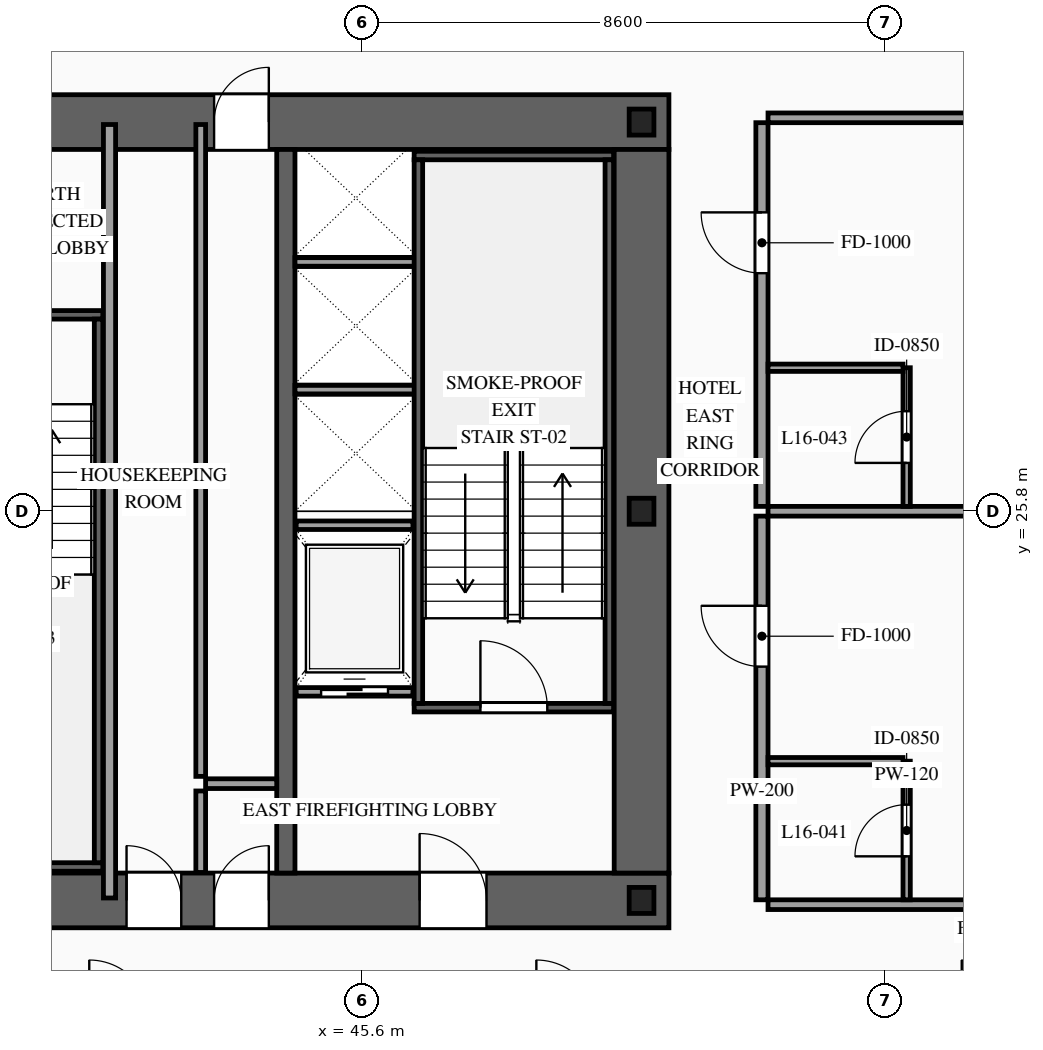
"""IFC4 building model, lengths in metres.
Left out: names, types, materials, properties, quantities, classifications, styles, units other than length and angle.
Written with IfcOpenShell. Run it as: python <this file> out.ifc"""

import sys

from ifc_helpers import new_model, si_unit, direction, frame, frame_2d, origin, origin_2d, place, context, subcontext, project, spatial, rectangle, i_section, extrude, source, transform, mapped, element, fill, save


model = new_model("IFC4")
c1 = context("Model", 3, precision=1e-05, world=origin(), true_north=direction((0.0, 1.0)))
c2 = subcontext(c1, "Body", "Model", "MODEL_VIEW")
j1 = project(units=[si_unit("LENGTHUNIT", "METRE"), si_unit("PLANEANGLEUNIT", "RADIAN")], contexts=[c1])
p1 = place(None, origin())
s1 = spatial("IfcSite", under=j1, at=p1, CompositionType="ELEMENT")
p2 = place(p1, origin())
s2 = spatial("IfcBuilding", under=s1, at=p2, CompositionType="ELEMENT")
p3 = place(p2, frame((0.0, 0.0, 64.0)))
s3 = spatial("IfcBuildingStorey", under=s2, at=p3, CompositionType="ELEMENT", Elevation=64.0)
p4 = place(p3, frame((23.35, 19.4, 0.0), z_axis=(0.0, 0.0, 1.0), x_axis=(1.0, 0.0, 0.0)))
e1 = element("IfcWall", 1, at=p4, inside=s3, PredefinedType="SHEAR", context=c2, shape_type="SweptSolid", body=[
    extrude(rectangle(XDim=27.3, YDim=0.9, at=frame_2d((13.65, 0.0))), origin(), (0.0, 0.0, 1.0), 3.6),
])
p5 = place(p4, frame((2.1, 0.0, 0.0)))
e2 = element("IfcOpeningElement", 2, at=p5, cuts=e1, PredefinedType="OPENING", context=c2, shape_type="SweptSolid", body=[
    extrude(rectangle(XDim=1.1, YDim=2.2, at=frame_2d((0.55, 1.1))), frame((0.0, 0.465, 0.0), z_axis=(0.0, -1.0, 0.0), x_axis=(1.0, 0.0, 0.0)), (0.0, 0.0, 1.0), 0.93),
])
p6 = place(p4, frame((10.0, 0.0, 0.0)))
e3 = element("IfcOpeningElement", 3, at=p6, cuts=e1, PredefinedType="OPENING", context=c2, shape_type="SweptSolid", body=[
    extrude(rectangle(XDim=1.1, YDim=2.2, at=frame_2d((0.55, 1.1))), frame((0.0, 0.465, 0.0), z_axis=(0.0, -1.0, 0.0), x_axis=(1.0, 0.0, 0.0)), (0.0, 0.0, 1.0), 0.93),
])
p7 = place(p4, frame((23.2, 0.0, 0.0)))
e4 = element("IfcOpeningElement", 4, at=p7, cuts=e1, PredefinedType="OPENING", context=c2, shape_type="SweptSolid", body=[
    extrude(rectangle(XDim=1.1, YDim=2.2, at=frame_2d((0.55, 1.1))), frame((0.0, 0.465, 0.0), z_axis=(0.0, -1.0, 0.0), x_axis=(1.0, 0.0, 0.0)), (0.0, 0.0, 1.0), 0.93),
])
p8 = place(p4, frame((19.82, 0.0, 0.0)))
e5 = element("IfcOpeningElement", 5, at=p8, cuts=e1, PredefinedType="OPENING", context=c2, shape_type="SweptSolid", body=[
    extrude(rectangle(XDim=0.9, YDim=2.15, at=frame_2d((0.45, 1.075))), frame((0.0, 0.465, 0.0), z_axis=(0.0, -1.0, 0.0), x_axis=(1.0, 0.0, 0.0)), (0.0, 0.0, 1.0), 0.93),
])
p9 = place(p4, frame((18.38, 0.0, 0.0)))
e6 = element("IfcOpeningElement", 6, at=p9, cuts=e1, PredefinedType="OPENING", context=c2, shape_type="SweptSolid", body=[
    extrude(rectangle(XDim=0.9, YDim=2.15, at=frame_2d((0.45, 1.075))), frame((0.0, 0.465, 0.0), z_axis=(0.0, -1.0, 0.0), x_axis=(1.0, 0.0, 0.0)), (0.0, 0.0, 1.0), 0.93),
])
p10 = place(p3, frame((23.35, 32.2, 0.0), z_axis=(0.0, 0.0, 1.0), x_axis=(1.0, 0.0, 0.0)))
e7 = element("IfcWall", 7, at=p10, inside=s3, PredefinedType="SHEAR", context=c2, shape_type="SweptSolid", body=[
    extrude(rectangle(XDim=27.3, YDim=0.9, at=frame_2d((13.65, 0.0))), origin(), (0.0, 0.0, 1.0), 3.6),
])
p11 = place(p10, frame((4.72, 0.0, 0.0)))
e8 = element("IfcOpeningElement", 8, at=p11, cuts=e7, PredefinedType="OPENING", context=c2, shape_type="SweptSolid", body=[
    extrude(rectangle(XDim=0.9, YDim=2.15, at=frame_2d((0.45, 1.075))), frame((0.0, 0.465, 0.0), z_axis=(0.0, -1.0, 0.0), x_axis=(1.0, 0.0, 0.0)), (0.0, 0.0, 1.0), 0.93),
])
p12 = place(p10, frame((10.0, 0.0, 0.0)))
e9 = element("IfcOpeningElement", 9, at=p12, cuts=e7, PredefinedType="OPENING", context=c2, shape_type="SweptSolid", body=[
    extrude(rectangle(XDim=1.1, YDim=2.2, at=frame_2d((0.55, 1.1))), frame((0.0, 0.465, 0.0), z_axis=(0.0, -1.0, 0.0), x_axis=(1.0, 0.0, 0.0)), (0.0, 0.0, 1.0), 0.93),
])
p13 = place(p10, frame((15.85, 0.0, 0.0)))
e10 = element("IfcOpeningElement", 10, at=p13, cuts=e7, PredefinedType="OPENING", context=c2, shape_type="SweptSolid", body=[
    extrude(rectangle(XDim=1.1, YDim=2.2, at=frame_2d((0.55, 1.1))), frame((0.0, 0.465, 0.0), z_axis=(0.0, -1.0, 0.0), x_axis=(1.0, 0.0, 0.0)), (0.0, 0.0, 1.0), 0.93),
])
p14 = place(p10, frame((19.82, 0.0, 0.0)))
e11 = element("IfcOpeningElement", 11, at=p14, cuts=e7, PredefinedType="OPENING", context=c2, shape_type="SweptSolid", body=[
    extrude(rectangle(XDim=0.9, YDim=2.15, at=frame_2d((0.45, 1.075))), frame((0.0, 0.465, 0.0), z_axis=(0.0, -1.0, 0.0), x_axis=(1.0, 0.0, 0.0)), (0.0, 0.0, 1.0), 0.93),
])
m1 = source(origin(), c2, "Body", "SweptSolid", [
    extrude(rectangle(XDim=11.9, YDim=0.9, at=frame_2d((5.95, 0.0))), origin(), (0.0, 0.0, 1.0), 3.6),
])
p15 = place(p3, frame((50.2, 19.85, 0.0), z_axis=(0.0, 0.0, 1.0), x_axis=(0.0, 1.0, 0.0)))
e12 = element("IfcWall", 12, at=p15, inside=s3, PredefinedType="SHEAR", context=c2, shape_type="MappedRepresentation", body=[
    mapped(m1, transform((0.0, 0.0, 0.0), scale=1.0)),
])
m2 = source(origin(), c2, "Body", "SweptSolid", [
    extrude(rectangle(XDim=11.9, YDim=0.3, at=frame_2d((5.95, 0.0))), origin(), (0.0, 0.0, 1.0), 3.6),
])
p16 = place(p3, frame((44.35, 19.85, 0.0), z_axis=(0.0, 0.0, 1.0), x_axis=(0.0, 1.0, 0.0)))
e13 = element("IfcWall", 13, at=p16, inside=s3, PredefinedType="SOLIDWALL", context=c2, shape_type="MappedRepresentation", body=[
    mapped(m2, transform((0.0, 0.0, 0.0), scale=1.0)),
])
m3 = source(origin(), c2, "Body", "SweptSolid", [
    extrude(i_section(OverallWidth=0.407, OverallDepth=0.428, WebThickness=0.02, FlangeThickness=0.035, at=origin_2d()), origin(), (0.0, 0.0, 1.0), 3.6),
])
for number, where, z_axis, x_axis in (
    (14, (50.2, 19.4, 0.0), (0.0, 0.0, 1.0), (1.0, 0.0, 0.0)),
    (15, (50.2, 25.8, 0.0), (0.0, 0.0, 1.0), (1.0, 0.0, 0.0)),
    (16, (50.2, 32.2, 0.0), (0.0, 0.0, 1.0), (1.0, 0.0, 0.0)),
):
    element("IfcColumn", number, at=place(p3, frame(where, z_axis=z_axis, x_axis=x_axis)), inside=s3, PredefinedType="COLUMN", context=c2, shape_type="MappedRepresentation", body=[
        mapped(m3, transform((0.0, 0.0, 0.0), scale=1.0)),
    ])
p17 = place(p3, frame((44.52, 22.83, 0.0), z_axis=(0.0, 0.0, 1.0), x_axis=(1.0, 0.0, 0.0)))
e17 = element("IfcWall", 17, at=p17, inside=s3, PredefinedType="SOLIDWALL", context=c2, shape_type="SweptSolid", body=[
    extrude(rectangle(XDim=1.92, YDim=0.14, at=frame_2d((0.96, 0.0))), origin(), (0.0, 0.0, 1.0), 3.38),
])
p18 = place(p17, frame((0.41, 0.0, 0.0)))
e18 = element("IfcOpeningElement", 18, at=p18, cuts=e17, PredefinedType="OPENING", context=c2, shape_type="SweptSolid", body=[
    extrude(rectangle(XDim=1.1, YDim=2.2, at=frame_2d((0.55, 1.1))), frame((0.0, 0.085, 0.0), z_axis=(0.0, -1.0, 0.0), x_axis=(1.0, 0.0, 0.0)), (0.0, 0.0, 1.0), 0.17),
])
m4 = source(origin(), c2, "Body", "SweptSolid", [
    extrude(rectangle(XDim=1.92, YDim=0.14, at=frame_2d((0.96, 0.0))), origin(), (0.0, 0.0, 1.0), 3.38),
])
p19 = place(p3, frame((44.52, 25.57, 0.0), z_axis=(0.0, 0.0, 1.0), x_axis=(1.0, 0.0, 0.0)))
e19 = element("IfcWall", 19, at=p19, inside=s3, PredefinedType="SOLIDWALL", context=c2, shape_type="MappedRepresentation", body=[
    mapped(m4, transform((0.0, 0.0, 0.0), scale=1.0)),
])
m5 = source(origin(), c2, "Body", "SweptSolid", [
    extrude(rectangle(XDim=2.0, YDim=0.14, at=frame_2d((1.0, 0.0))), origin(), (0.0, 0.0, 1.0), 3.38),
])
for number, where, z_axis, x_axis in (
    (20, (44.5, 27.8, 0.0), (0.0, 0.0, 1.0), (1.0, 0.0, 0.0)),
    (21, (44.5, 29.9, 0.0), (0.0, 0.0, 1.0), (1.0, 0.0, 0.0)),
):
    element("IfcWall", number, at=place(p3, frame(where, z_axis=z_axis, x_axis=x_axis)), inside=s3, PredefinedType="SOLIDWALL", context=c2, shape_type="MappedRepresentation", body=[
        mapped(m5, transform((0.0, 0.0, 0.0), scale=1.0)),
    ])
p20 = place(p3, frame((46.46, 22.57, 0.0), z_axis=(0.0, 0.0, 1.0), x_axis=(1.0, 0.0, 0.0)))
e22 = element("IfcWall", 22, at=p20, inside=s3, PredefinedType="SOLIDWALL", context=c2, shape_type="SweptSolid", body=[
    extrude(rectangle(XDim=3.28, YDim=0.14, at=frame_2d((1.64, 0.0))), origin(), (0.0, 0.0, 1.0), 3.38),
])
p21 = place(p20, frame((1.09, 0.0, 0.0)))
e23 = element("IfcOpeningElement", 23, at=p21, cuts=e22, PredefinedType="OPENING", context=c2, shape_type="SweptSolid", body=[
    extrude(rectangle(XDim=1.1, YDim=2.2, at=frame_2d((0.55, 1.1))), frame((0.0, 0.085, 0.0), z_axis=(0.0, -1.0, 0.0), x_axis=(1.0, 0.0, 0.0)), (0.0, 0.0, 1.0), 0.17),
])
m6 = source(origin(), c2, "Body", "SweptSolid", [
    extrude(rectangle(XDim=3.28, YDim=0.14, at=frame_2d((1.64, 0.0))), origin(), (0.0, 0.0, 1.0), 3.38),
])
p22 = place(p3, frame((46.46, 31.65, 0.0), z_axis=(0.0, 0.0, 1.0), x_axis=(1.0, 0.0, 0.0)))
e24 = element("IfcWall", 24, at=p22, inside=s3, PredefinedType="SOLIDWALL", context=c2, shape_type="MappedRepresentation", body=[
    mapped(m6, transform((0.0, 0.0, 0.0), scale=1.0)),
])
m7 = source(origin(), c2, "Body", "SweptSolid", [
    extrude(rectangle(XDim=8.94, YDim=0.14, at=frame_2d((4.47, 0.0))), origin(), (0.0, 0.0, 1.0), 3.38),
])
for number, where, z_axis, x_axis in (
    (25, (46.53, 22.64, 0.0), (0.0, 0.0, 1.0), (0.0, 1.0, 0.0)),
    (26, (49.67, 22.64, 0.0), (0.0, 0.0, 1.0), (0.0, 1.0, 0.0)),
):
    element("IfcWall", number, at=place(p3, frame(where, z_axis=z_axis, x_axis=x_axis)), inside=s3, PredefinedType="SOLIDWALL", context=c2, shape_type="MappedRepresentation", body=[
        mapped(m7, transform((0.0, 0.0, 0.0), scale=1.0)),
    ])
p23 = place(p3, frame((38.2, 29.03, 0.0), z_axis=(0.0, 0.0, 1.0), x_axis=(1.0, 0.0, 0.0)))
e27 = element("IfcWall", 27, at=p23, inside=s3, PredefinedType="SOLIDWALL", context=c2, shape_type="SweptSolid", body=[
    extrude(rectangle(XDim=3.14, YDim=0.14, at=frame_2d((1.57, 0.0))), origin(), (0.0, 0.0, 1.0), 3.38),
])
p24 = place(p23, frame((1.02, 0.0, 0.0)))
e28 = element("IfcOpeningElement", 28, at=p24, cuts=e27, PredefinedType="OPENING", context=c2, shape_type="SweptSolid", body=[
    extrude(rectangle(XDim=1.1, YDim=2.2, at=frame_2d((0.55, 1.1))), frame((0.0, 0.085, 0.0), z_axis=(0.0, -1.0, 0.0), x_axis=(1.0, 0.0, 0.0)), (0.0, 0.0, 1.0), 0.17),
])
m8 = source(origin(), c2, "Body", "SweptSolid", [
    extrude(rectangle(XDim=3.14, YDim=0.14, at=frame_2d((1.57, 0.0))), origin(), (0.0, 0.0, 1.0), 3.38),
])
p25 = place(p3, frame((38.2, 19.95, 0.0), z_axis=(0.0, 0.0, 1.0), x_axis=(1.0, 0.0, 0.0)))
e29 = element("IfcWall", 29, at=p25, inside=s3, PredefinedType="SOLIDWALL", context=c2, shape_type="MappedRepresentation", body=[
    mapped(m8, transform((0.0, 0.0, 0.0), scale=1.0)),
])
m9 = source(origin(), c2, "Body", "SweptSolid", [
    extrude(rectangle(XDim=8.94, YDim=0.14, at=frame_2d((4.47, 0.0))), origin(), (0.0, 0.0, 1.0), 3.38),
])
p26 = place(p3, frame((41.27, 20.02, 0.0), z_axis=(0.0, 0.0, 1.0), x_axis=(0.0, 1.0, 0.0)))
e30 = element("IfcWall", 30, at=p26, inside=s3, PredefinedType="SOLIDWALL", context=c2, shape_type="MappedRepresentation", body=[
    mapped(m9, transform((0.0, 0.0, 0.0), scale=1.0)),
])
m10 = source(origin(), c2, "Body", "SweptSolid", [
    extrude(rectangle(XDim=1.34, YDim=0.16, at=frame_2d((0.67, 0.0))), origin(), (0.0, 0.0, 1.0), 3.38),
])
p27 = place(p3, frame((42.95, 19.86, 0.0), z_axis=(0.0, 0.0, 1.0), x_axis=(0.0, 1.0, 0.0)))
e31 = element("IfcWall", 31, at=p27, inside=s3, PredefinedType="PARTITIONING", context=c2, shape_type="MappedRepresentation", body=[
    mapped(m10, transform((0.0, 0.0, 0.0), scale=1.0)),
])
m11 = source(origin(), c2, "Body", "SweptSolid", [
    extrude(rectangle(XDim=1.17, YDim=0.16, at=frame_2d((0.585, 0.0))), origin(), (0.0, 0.0, 1.0), 3.38),
])
p28 = place(p3, frame((43.03, 21.32, 0.0), z_axis=(0.0, 0.0, 1.0), x_axis=(1.0, 0.0, 0.0)))
e32 = element("IfcWall", 32, at=p28, inside=s3, PredefinedType="PARTITIONING", context=c2, shape_type="MappedRepresentation", body=[
    mapped(m11, transform((0.0, 0.0, 0.0), scale=1.0)),
])
m12 = source(origin(), c2, "Body", "SweptSolid", [
    extrude(rectangle(XDim=12.72, YDim=0.2, at=frame_2d((6.36, 0.0))), origin(), (0.0, 0.0, 1.0), 3.38),
])
p29 = place(p3, frame((41.45, 19.44, 0.0), z_axis=(0.0, 0.0, 1.0), x_axis=(0.0, 1.0, 0.0)))
e33 = element("IfcWall", 33, at=p29, inside=s3, PredefinedType="PARTITIONING", context=c2, shape_type="MappedRepresentation", body=[
    mapped(m12, transform((0.0, 0.0, 0.0), scale=1.0)),
])
m13 = source(origin(), c2, "Body", "SweptSolid", [
    extrude(rectangle(XDim=10.72, YDim=0.16, at=frame_2d((5.36, 0.0))), origin(), (0.0, 0.0, 1.0), 3.38),
])
p30 = place(p3, frame((42.95, 21.44, 0.0), z_axis=(0.0, 0.0, 1.0), x_axis=(0.0, 1.0, 0.0)))
e34 = element("IfcWall", 34, at=p30, inside=s3, PredefinedType="PARTITIONING", context=c2, shape_type="MappedRepresentation", body=[
    mapped(m13, transform((0.0, 0.0, 0.0), scale=1.0)),
])
p31 = place(p3, frame((52.18, 19.41, 0.0), z_axis=(0.0, 0.0, 1.0), x_axis=(0.0, 1.0, 0.0)))
e35 = element("IfcWall", 35, at=p31, inside=s3, PredefinedType="PARTITIONING", context=c2, shape_type="SweptSolid", body=[
    extrude(rectangle(XDim=6.31, YDim=0.2, at=frame_2d((3.155, 0.0))), origin(), (0.0, 0.0, 1.0), 3.38),
])
p32 = place(p31, frame((3.835, 0.0, 0.0)))
e36 = element("IfcOpeningElement", 36, at=p32, cuts=e35, PredefinedType="OPENING", context=c2, shape_type="SweptSolid", body=[
    extrude(rectangle(XDim=1.0, YDim=2.2, at=frame_2d((0.5, 1.1))), frame((0.0, 0.115, 0.0), z_axis=(0.0, -1.0, 0.0), x_axis=(1.0, 0.0, 0.0)), (0.0, 0.0, 1.0), 0.23),
])
m14 = source(origin(), c2, "Body", "SweptSolid", [
    extrude(rectangle(XDim=9.67, YDim=0.16, at=frame_2d((4.835, 0.0))), origin(), (0.0, 0.0, 1.0), 2.575),
])
p33 = place(p3, frame((52.28, 25.8, 0.0), z_axis=(0.0, 0.0, 1.0), x_axis=(1.0, 0.0, 0.0)))
e37 = element("IfcWall", 37, at=p33, inside=s3, PredefinedType="PARTITIONING", context=c2, shape_type="MappedRepresentation", body=[
    mapped(m14, transform((0.0, 0.0, 0.0), scale=1.0)),
])
m15 = source(origin(), c2, "Body", "SweptSolid", [
    extrude(rectangle(XDim=9.67, YDim=0.16, at=frame_2d((4.835, 0.0))), origin(), (0.0, 0.0, 1.0), 2.875),
])
p34 = place(p3, frame((52.28, 19.33, 0.0), z_axis=(0.0, 0.0, 1.0), x_axis=(1.0, 0.0, 0.0)))
e38 = element("IfcWall", 38, at=p34, inside=s3, PredefinedType="PARTITIONING", context=c2, shape_type="MappedRepresentation", body=[
    mapped(m15, transform((0.0, 0.0, 0.0), scale=1.0)),
])
p35 = place(p3, frame((54.56, 19.41, 0.0), z_axis=(0.0, 0.0, 1.0), x_axis=(0.0, 1.0, 0.0)))
e39 = element("IfcWall", 39, at=p35, inside=s3, PredefinedType="PARTITIONING", context=c2, shape_type="SweptSolid", body=[
    extrude(rectangle(XDim=2.28, YDim=0.12, at=frame_2d((1.14, 0.0))), origin(), (0.0, 0.0, 1.0), 3.38),
])
p36 = place(p35, frame((0.715, 0.0, 0.0)))
e40 = element("IfcOpeningElement", 40, at=p36, cuts=e39, PredefinedType="OPENING", context=c2, shape_type="SweptSolid", body=[
    extrude(rectangle(XDim=0.85, YDim=2.1, at=frame_2d((0.425, 1.05))), frame((0.0, 0.075, 0.0), z_axis=(0.0, -1.0, 0.0), x_axis=(1.0, 0.0, 0.0)), (0.0, 0.0, 1.0), 0.15),
])
m16 = source(origin(), c2, "Body", "SweptSolid", [
    extrude(rectangle(XDim=2.22, YDim=0.12, at=frame_2d((1.11, 0.0))), origin(), (0.0, 0.0, 1.0), 3.38),
])
p37 = place(p3, frame((52.28, 21.69, 0.0), z_axis=(0.0, 0.0, 1.0), x_axis=(1.0, 0.0, 0.0)))
e41 = element("IfcWall", 41, at=p37, inside=s3, PredefinedType="PARTITIONING", context=c2, shape_type="MappedRepresentation", body=[
    mapped(m16, transform((0.0, 0.0, 0.0), scale=1.0)),
])
p38 = place(p3, frame((52.18, 25.88, 0.0), z_axis=(0.0, 0.0, 1.0), x_axis=(0.0, 1.0, 0.0)))
e42 = element("IfcWall", 42, at=p38, inside=s3, PredefinedType="PARTITIONING", context=c2, shape_type="SweptSolid", body=[
    extrude(rectangle(XDim=6.31, YDim=0.2, at=frame_2d((3.155, 0.0))), origin(), (0.0, 0.0, 1.0), 3.38),
])
p39 = place(p38, frame((3.835, 0.0, 0.0)))
e43 = element("IfcOpeningElement", 43, at=p39, cuts=e42, PredefinedType="OPENING", context=c2, shape_type="SweptSolid", body=[
    extrude(rectangle(XDim=1.0, YDim=2.2, at=frame_2d((0.5, 1.1))), frame((0.0, 0.115, 0.0), z_axis=(0.0, -1.0, 0.0), x_axis=(1.0, 0.0, 0.0)), (0.0, 0.0, 1.0), 0.23),
])
p40 = place(p3, frame((52.28, 32.27, 0.0), z_axis=(0.0, 0.0, 1.0), x_axis=(1.0, 0.0, 0.0)))
e44 = element("IfcWall", 44, at=p40, inside=s3, PredefinedType="PARTITIONING", context=c2, shape_type="MappedRepresentation", body=[
    mapped(m15, transform((0.0, 0.0, 0.0), scale=1.0)),
])
p41 = place(p3, frame((54.56, 25.88, 0.0), z_axis=(0.0, 0.0, 1.0), x_axis=(0.0, 1.0, 0.0)))
e45 = element("IfcWall", 45, at=p41, inside=s3, PredefinedType="PARTITIONING", context=c2, shape_type="SweptSolid", body=[
    extrude(rectangle(XDim=2.28, YDim=0.12, at=frame_2d((1.14, 0.0))), origin(), (0.0, 0.0, 1.0), 3.38),
])
p42 = place(p41, frame((0.715, 0.0, 0.0)))
e46 = element("IfcOpeningElement", 46, at=p42, cuts=e45, PredefinedType="OPENING", context=c2, shape_type="SweptSolid", body=[
    extrude(rectangle(XDim=0.85, YDim=2.1, at=frame_2d((0.425, 1.05))), frame((0.0, 0.075, 0.0), z_axis=(0.0, -1.0, 0.0), x_axis=(1.0, 0.0, 0.0)), (0.0, 0.0, 1.0), 0.15),
])
p43 = place(p3, frame((52.28, 28.16, 0.0), z_axis=(0.0, 0.0, 1.0), x_axis=(1.0, 0.0, 0.0)))
e47 = element("IfcWall", 47, at=p43, inside=s3, PredefinedType="PARTITIONING", context=c2, shape_type="MappedRepresentation", body=[
    mapped(m16, transform((0.0, 0.0, 0.0), scale=1.0)),
])
m17 = source(origin(), c2, "Body", "SweptSolid", [
    extrude(rectangle(XDim=1.1, YDim=2.2, at=frame_2d((0.55, 1.1))), frame((0.0, 0.025, 0.0), z_axis=(0.0, -1.0, 0.0), x_axis=(1.0, 0.0, 0.0)), (0.0, 0.0, 1.0), 0.05),
])
p44 = place(p18, origin())
e48 = element("IfcDoor", 48, at=p44, inside=s3, OperationType="SLIDING_TO_RIGHT", PredefinedType="DOOR", context=c2, shape_type="MappedRepresentation", body=[
    mapped(m17, transform((0.0, 0.0, 0.0), scale=1.0)),
])
fill(e18, e48)
m18 = source(origin(), c2, "Body", "SweptSolid", [
    extrude(rectangle(XDim=1.1, YDim=2.2, at=frame_2d((0.55, 1.1))), frame((0.0, 0.025, 0.0), z_axis=(0.0, -1.0, 0.0), x_axis=(1.0, 0.0, 0.0)), (0.0, 0.0, 1.0), 0.05),
])
p45 = place(p21, origin())
e49 = element("IfcDoor", 49, at=p45, inside=s3, OperationType="SINGLE_SWING_LEFT", PredefinedType="DOOR", context=c2, shape_type="MappedRepresentation", body=[
    mapped(m18, transform((0.0, 0.0, 0.0), scale=1.0)),
])
fill(e23, e49)
p46 = place(p7, origin())
e50 = element("IfcDoor", 50, at=p46, inside=s3, OperationType="SINGLE_SWING_LEFT", PredefinedType="DOOR", context=c2, shape_type="MappedRepresentation", body=[
    mapped(m18, transform((0.0, 0.0, 0.0), scale=1.0)),
])
fill(e4, e50)
m19 = source(origin(), c2, "Body", "SweptSolid", [
    extrude(rectangle(XDim=0.9, YDim=2.15, at=frame_2d((0.45, 1.075))), frame((0.0, 0.025, 0.0), z_axis=(0.0, -1.0, 0.0), x_axis=(1.0, 0.0, 0.0)), (0.0, 0.0, 1.0), 0.05),
])
p47 = place(p8, origin())
e51 = element("IfcDoor", 51, at=p47, inside=s3, OperationType="SINGLE_SWING_RIGHT", PredefinedType="DOOR", context=c2, shape_type="MappedRepresentation", body=[
    mapped(m19, transform((0.0, 0.0, 0.0), scale=1.0)),
])
fill(e5, e51)
p48 = place(p9, origin())
e52 = element("IfcDoor", 52, at=p48, inside=s3, OperationType="SINGLE_SWING_LEFT", PredefinedType="DOOR", context=c2, shape_type="MappedRepresentation", body=[
    mapped(m19, transform((0.0, 0.0, 0.0), scale=1.0)),
])
fill(e6, e52)
p49 = place(p14, origin())
e53 = element("IfcDoor", 53, at=p49, inside=s3, OperationType="SINGLE_SWING_RIGHT", PredefinedType="DOOR", context=c2, shape_type="MappedRepresentation", body=[
    mapped(m19, transform((0.0, 0.0, 0.0), scale=1.0)),
])
fill(e11, e53)
m20 = source(origin(), c2, "Body", "SweptSolid", [
    extrude(rectangle(XDim=1.0, YDim=2.2, at=frame_2d((0.5, 1.1))), frame((0.0, 0.025, 0.0), z_axis=(0.0, -1.0, 0.0), x_axis=(1.0, 0.0, 0.0)), (0.0, 0.0, 1.0), 0.05),
])
p50 = place(p32, origin())
e54 = element("IfcDoor", 54, at=p50, inside=s3, OperationType="SINGLE_SWING_RIGHT", PredefinedType="DOOR", context=c2, shape_type="MappedRepresentation", body=[
    mapped(m20, transform((0.0, 0.0, 0.0), scale=1.0)),
])
fill(e36, e54)
m21 = source(origin(), c2, "Body", "SweptSolid", [
    extrude(rectangle(XDim=0.85, YDim=2.1, at=frame_2d((0.425, 1.05))), frame((0.0, 0.025, 0.0), z_axis=(0.0, -1.0, 0.0), x_axis=(1.0, 0.0, 0.0)), (0.0, 0.0, 1.0), 0.05),
])
p51 = place(p36, origin())
e55 = element("IfcDoor", 55, at=p51, inside=s3, OperationType="SINGLE_SWING_LEFT", PredefinedType="DOOR", context=c2, shape_type="MappedRepresentation", body=[
    mapped(m21, transform((0.0, 0.0, 0.0), scale=1.0)),
])
fill(e40, e55)
p52 = place(p39, origin())
e56 = element("IfcDoor", 56, at=p52, inside=s3, OperationType="SINGLE_SWING_RIGHT", PredefinedType="DOOR", context=c2, shape_type="MappedRepresentation", body=[
    mapped(m20, transform((0.0, 0.0, 0.0), scale=1.0)),
])
fill(e43, e56)
p53 = place(p42, origin())
e57 = element("IfcDoor", 57, at=p53, inside=s3, OperationType="SINGLE_SWING_LEFT", PredefinedType="DOOR", context=c2, shape_type="MappedRepresentation", body=[
    mapped(m21, transform((0.0, 0.0, 0.0), scale=1.0)),
])
fill(e46, e57)
save(model, sys.argv[1])
